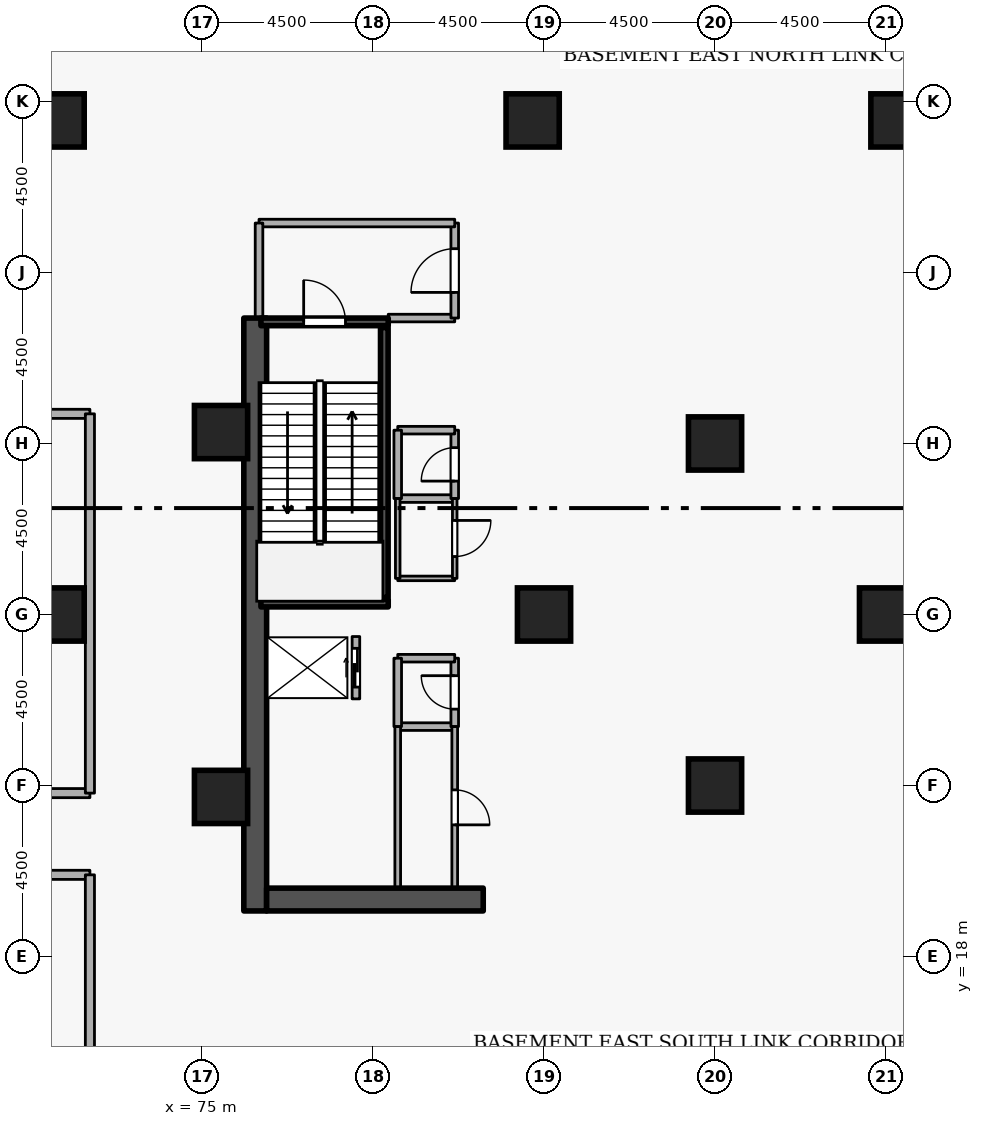
"""IFC4 building model, lengths in metres.
Left out: names, types, materials, properties, quantities, classifications, styles, units other than length and angle.
Written with IfcOpenShell. Run it as: python <this file> out.ifc"""

import sys

from ifc_helpers import new_model, si_unit, direction, frame, frame_2d, origin, origin_2d, place, context, subcontext, project, spatial, rectangle, extrude, element, fill, save


model = new_model("IFC4")
c1 = context("Model", 3, precision=1e-05, world=origin(), true_north=direction((0.0, 1.0)))
c2 = subcontext(c1, "Body", "Model", "MODEL_VIEW")
j1 = project(units=[si_unit("LENGTHUNIT", "METRE"), si_unit("PLANEANGLEUNIT", "RADIAN")], contexts=[c1])
p1 = place(None, origin())
s1 = spatial("IfcSite", under=j1, at=p1, CompositionType="ELEMENT")
p2 = place(p1, origin())
s2 = spatial("IfcBuilding", under=s1, at=p2, CompositionType="ELEMENT")
p3 = place(p2, frame((0.0, 0.0, -5.4)))
s3 = spatial("IfcBuildingStorey", under=s2, at=p3, CompositionType="ELEMENT", Elevation=-5.4)
p4 = place(p3, frame((76.4, 19.2, -0.6), z_axis=(0.0, 0.0, 1.0), x_axis=(0.0, 1.0, 0.0)))
e1 = element("IfcWall", 1, at=p4, inside=s3, PredefinedType="SHEAR", context=c2, shape_type="SweptSolid", body=[
    extrude(rectangle(XDim=15.6, YDim=0.6, at=frame_2d((7.8, 0.0))), origin(), (0.0, 0.0, 1.0), 6.0),
])
p5 = place(p3, frame((76.7, 19.5, -0.6), z_axis=(0.0, 0.0, 1.0), x_axis=(1.0, 0.0, 0.0)))
e2 = element("IfcWall", 2, at=p5, inside=s3, PredefinedType="SHEAR", context=c2, shape_type="SweptSolid", body=[
    extrude(rectangle(XDim=5.7, YDim=0.6, at=frame_2d((2.85, 0.0))), origin(), (0.0, 0.0, 1.0), 6.0),
])
for number, where, z_axis, x_axis in (
    (3, (71.2, 27.0, -0.6), (0.0, 0.0, 1.0), (1.0, 0.0, 0.0)),
    (4, (71.2, 40.0, -0.6), (0.0, 0.0, 1.0), (1.0, 0.0, 0.0)),
    (5, (93.3, 40.0, -0.6), (0.0, 0.0, 1.0), (1.0, 0.0, 0.0)),
    (6, (83.7, 40.0, -0.6), (0.0, 0.0, 1.0), (1.0, 0.0, 0.0)),
    (7, (75.5, 22.2, -0.6), (0.0, 0.0, 1.0), (1.0, 0.0, 0.0)),
    (8, (75.5, 31.8, -0.6), (0.0, 0.0, 1.0), (1.0, 0.0, 0.0)),
    (9, (93.0, 27.0, -0.6), (0.0, 0.0, 1.0), (1.0, 0.0, 0.0)),
    (10, (84.0, 27.0, -0.6), (0.0, 0.0, 1.0), (1.0, 0.0, 0.0)),
    (11, (88.5, 22.5, -0.6), (0.0, 0.0, 1.0), (1.0, 0.0, 0.0)),
    (12, (88.5, 31.5, -0.6), (0.0, 0.0, 1.0), (1.0, 0.0, 0.0)),
):
    element("IfcColumn", number, at=place(p3, frame(where, z_axis=z_axis, x_axis=x_axis)), inside=s3, PredefinedType="COLUMN", context=c2, shape_type="SweptSolid", body=[
        extrude(rectangle(XDim=1.4, YDim=1.4, at=origin_2d()), origin(), (0.0, 0.0, 1.0), 6.0),
    ])
p6 = place(p3, frame((79.05, 24.78, 0.0), z_axis=(0.0, 0.0, 1.0), x_axis=(0.0, 1.0, 0.0)))
e13 = element("IfcWall", 13, at=p6, inside=s3, PredefinedType="STANDARD", context=c2, shape_type="SweptSolid", body=[
    extrude(rectangle(XDim=1.64, YDim=0.2, at=frame_2d((0.82, 0.0))), origin(), (0.0, 0.0, 1.0), 5.06),
])
p7 = place(p6, frame((0.31, 0.0, 0.0)))
e14 = element("IfcOpeningElement", 14, at=p7, cuts=e13, PredefinedType="OPENING", context=c2, shape_type="SweptSolid", body=[
    extrude(rectangle(XDim=1.02, YDim=2.06, at=frame_2d((0.51, 1.03))), frame((0.0, 0.11, 0.0), z_axis=(0.0, -1.0, 0.0), x_axis=(1.0, 0.0, 0.0)), (0.0, 0.0, 1.0), 0.22),
])
p8 = place(p3, frame((76.55, 34.7, -0.6), z_axis=(0.0, 0.0, 1.0), x_axis=(1.0, 0.0, 0.0)))
e15 = element("IfcWall", 15, at=p8, inside=s3, PredefinedType="SHEAR", context=c2, shape_type="SweptSolid", body=[
    extrude(rectangle(XDim=3.35, YDim=0.2, at=frame_2d((1.675, 0.0))), origin(), (0.0, 0.0, 1.0), 6.0),
])
p9 = place(p8, frame((1.125, 0.0, 0.6)))
e16 = element("IfcOpeningElement", 16, at=p9, cuts=e15, PredefinedType="OPENING", context=c2, shape_type="SweptSolid", body=[
    extrude(rectangle(XDim=1.1, YDim=2.1, at=frame_2d((0.55, 1.05))), frame((0.0, 0.11, 0.0), z_axis=(0.0, -1.0, 0.0), x_axis=(1.0, 0.0, 0.0)), (0.0, 0.0, 1.0), 0.22),
])
p10 = place(p3, frame((79.9, 27.3, -0.6), z_axis=(0.0, 0.0, 1.0), x_axis=(-1.0, 0.0, 0.0)))
e17 = element("IfcWall", 17, at=p10, inside=s3, PredefinedType="SHEAR", context=c2, shape_type="SweptSolid", body=[
    extrude(rectangle(XDim=3.35, YDim=0.2, at=frame_2d((1.675, 0.0))), origin(), (0.0, 0.0, 1.0), 6.0),
])
p11 = place(p3, frame((79.797, 27.45, -0.6), z_axis=(0.0, 0.0, 1.0), x_axis=(0.0, 1.0, 0.0)))
e18 = element("IfcWall", 18, at=p11, inside=s3, PredefinedType="SHEAR", context=c2, shape_type="SweptSolid", body=[
    extrude(rectangle(XDim=7.1, YDim=0.2, at=frame_2d((3.55, 0.0))), origin(), (0.0, 0.0, 1.0), 6.0),
])
p12 = place(p3, frame((79.9, 34.8, 0.0), z_axis=(0.0, 0.0, 1.0), x_axis=(1.0, 0.0, 0.0)))
e19 = element("IfcWall", 19, at=p12, inside=s3, PredefinedType="STANDARD", context=c2, shape_type="SweptSolid", body=[
    extrude(rectangle(XDim=1.75, YDim=0.2, at=frame_2d((0.875, 0.0))), origin(), (0.0, 0.0, 1.0), 4.265),
])
p13 = place(p3, frame((81.65, 34.8, 0.0), z_axis=(0.0, 0.0, 1.0), x_axis=(0.0, 1.0, 0.0)))
e20 = element("IfcWall", 20, at=p13, inside=s3, PredefinedType="STANDARD", context=c2, shape_type="SweptSolid", body=[
    extrude(rectangle(XDim=2.5, YDim=0.2, at=frame_2d((1.25, 0.0))), origin(), (0.0, 0.0, 1.0), 5.06),
])
p14 = place(p13, frame((0.675, 0.0, 0.0)))
e21 = element("IfcOpeningElement", 21, at=p14, cuts=e20, PredefinedType="OPENING", context=c2, shape_type="SweptSolid", body=[
    extrude(rectangle(XDim=1.15, YDim=2.1, at=frame_2d((0.575, 1.05))), frame((0.0, 0.11, 0.0), z_axis=(0.0, -1.0, 0.0), x_axis=(1.0, 0.0, 0.0)), (0.0, 0.0, 1.0), 0.22),
])
p15 = place(p3, frame((81.65, 37.3, 0.0), z_axis=(0.0, 0.0, 1.0), x_axis=(-1.0, 0.0, 0.0)))
e22 = element("IfcWall", 22, at=p15, inside=s3, PredefinedType="STANDARD", context=c2, shape_type="SweptSolid", body=[
    extrude(rectangle(XDim=5.15, YDim=0.2, at=frame_2d((2.575, 0.0))), origin(), (0.0, 0.0, 1.0), 5.06),
])
p16 = place(p3, frame((76.5, 37.3, 0.0), z_axis=(0.0, 0.0, 1.0), x_axis=(0.0, -1.0, 0.0)))
e23 = element("IfcWall", 23, at=p16, inside=s3, PredefinedType="STANDARD", context=c2, shape_type="SweptSolid", body=[
    extrude(rectangle(XDim=2.5, YDim=0.2, at=frame_2d((1.25, 0.0))), origin(), (0.0, 0.0, 1.0), 5.06),
])
p17 = place(p3, frame((80.15, 24.05, 0.0), z_axis=(0.0, 0.0, 1.0), x_axis=(1.0, 0.0, 0.0)))
e24 = element("IfcWall", 24, at=p17, inside=s3, PredefinedType="STANDARD", context=c2, shape_type="SweptSolid", body=[
    extrude(rectangle(XDim=1.5, YDim=0.2, at=frame_2d((0.75, 0.0))), origin(), (0.0, 0.0, 1.0), 5.06),
])
p18 = place(p3, frame((81.65, 24.05, 0.0), z_axis=(0.0, 0.0, 1.0), x_axis=(0.0, 1.0, 0.0)))
e25 = element("IfcWall", 25, at=p18, inside=s3, PredefinedType="STANDARD", context=c2, shape_type="SweptSolid", body=[
    extrude(rectangle(XDim=1.8, YDim=0.2, at=frame_2d((0.9, 0.0))), origin(), (0.0, 0.0, 1.0), 5.06),
])
p19 = place(p18, frame((0.46, 0.0, 0.0)))
e26 = element("IfcOpeningElement", 26, at=p19, cuts=e25, PredefinedType="OPENING", context=c2, shape_type="SweptSolid", body=[
    extrude(rectangle(XDim=0.88, YDim=2.04, at=frame_2d((0.44, 1.02))), frame((0.0, 0.11, 0.0), z_axis=(0.0, -1.0, 0.0), x_axis=(1.0, 0.0, 0.0)), (0.0, 0.0, 1.0), 0.22),
])
p20 = place(p3, frame((81.65, 25.85, 0.0), z_axis=(0.0, 0.0, 1.0), x_axis=(-1.0, 0.0, 0.0)))
e27 = element("IfcWall", 27, at=p20, inside=s3, PredefinedType="STANDARD", context=c2, shape_type="SweptSolid", body=[
    extrude(rectangle(XDim=1.5, YDim=0.2, at=frame_2d((0.75, 0.0))), origin(), (0.0, 0.0, 1.0), 5.06),
])
p21 = place(p3, frame((80.15, 25.85, 0.0), z_axis=(0.0, 0.0, 1.0), x_axis=(0.0, -1.0, 0.0)))
e28 = element("IfcWall", 28, at=p21, inside=s3, PredefinedType="STANDARD", context=c2, shape_type="SweptSolid", body=[
    extrude(rectangle(XDim=1.8, YDim=0.2, at=frame_2d((0.9, 0.0))), origin(), (0.0, 0.0, 1.0), 5.06),
])
p22 = place(p3, frame((80.15, 30.05, 0.0), z_axis=(0.0, 0.0, 1.0), x_axis=(1.0, 0.0, 0.0)))
e29 = element("IfcWall", 29, at=p22, inside=s3, PredefinedType="STANDARD", context=c2, shape_type="SweptSolid", body=[
    extrude(rectangle(XDim=1.5, YDim=0.2, at=frame_2d((0.75, 0.0))), origin(), (0.0, 0.0, 1.0), 5.06),
])
p23 = place(p3, frame((81.65, 30.05, 0.0), z_axis=(0.0, 0.0, 1.0), x_axis=(0.0, 1.0, 0.0)))
e30 = element("IfcWall", 30, at=p23, inside=s3, PredefinedType="STANDARD", context=c2, shape_type="SweptSolid", body=[
    extrude(rectangle(XDim=1.8, YDim=0.2, at=frame_2d((0.9, 0.0))), origin(), (0.0, 0.0, 1.0), 5.06),
])
p24 = place(p23, frame((0.46, 0.0, 0.0)))
e31 = element("IfcOpeningElement", 31, at=p24, cuts=e30, PredefinedType="OPENING", context=c2, shape_type="SweptSolid", body=[
    extrude(rectangle(XDim=0.88, YDim=2.04, at=frame_2d((0.44, 1.02))), frame((0.0, 0.11, 0.0), z_axis=(0.0, -1.0, 0.0), x_axis=(1.0, 0.0, 0.0)), (0.0, 0.0, 1.0), 0.22),
])
p25 = place(p3, frame((81.65, 31.85, 0.0), z_axis=(0.0, 0.0, 1.0), x_axis=(-1.0, 0.0, 0.0)))
e32 = element("IfcWall", 32, at=p25, inside=s3, PredefinedType="STANDARD", context=c2, shape_type="SweptSolid", body=[
    extrude(rectangle(XDim=1.5, YDim=0.2, at=frame_2d((0.75, 0.0))), origin(), (0.0, 0.0, 1.0), 5.06),
])
p26 = place(p3, frame((80.15, 31.85, 0.0), z_axis=(0.0, 0.0, 1.0), x_axis=(0.0, -1.0, 0.0)))
e33 = element("IfcWall", 33, at=p26, inside=s3, PredefinedType="STANDARD", context=c2, shape_type="SweptSolid", body=[
    extrude(rectangle(XDim=1.8, YDim=0.2, at=frame_2d((0.9, 0.0))), origin(), (0.0, 0.0, 1.0), 5.06),
])
p27 = place(p3, frame((55.8, 20.15, 0.0), z_axis=(0.0, 0.0, 1.0), x_axis=(1.0, 0.0, 0.0)))
e34 = element("IfcWall", 34, at=p27, inside=s3, PredefinedType="STANDARD", context=c2, shape_type="SweptSolid", body=[
    extrude(rectangle(XDim=16.25, YDim=0.24, at=frame_2d((8.125, 0.0))), origin(), (0.0, 0.0, 1.0), 5.06),
])
p28 = place(p27, frame((7.525, 0.0, 0.0)))
e35 = element("IfcOpeningElement", 35, at=p28, cuts=e34, PredefinedType="OPENING", context=c2, shape_type="SweptSolid", body=[
    extrude(rectangle(XDim=1.2, YDim=2.1, at=frame_2d((0.6, 1.05))), frame((0.0, 0.13, 0.0), z_axis=(0.0, -1.0, 0.0), x_axis=(1.0, 0.0, 0.0)), (0.0, 0.0, 1.0), 0.26),
])
p29 = place(p3, frame((72.05, 20.15, 0.0), z_axis=(0.0, 0.0, 1.0), x_axis=(0.0, -1.0, 0.0)))
e36 = element("IfcWall", 36, at=p29, inside=s3, PredefinedType="STANDARD", context=c2, shape_type="SweptSolid", body=[
    extrude(rectangle(XDim=14.15, YDim=0.24, at=frame_2d((7.075, 0.0))), origin(), (0.0, 0.0, 1.0), 5.06),
])
p30 = place(p3, frame((72.05, 22.3, 0.0), z_axis=(0.0, 0.0, 1.0), x_axis=(-1.0, 0.0, 0.0)))
e37 = element("IfcWall", 37, at=p30, inside=s3, PredefinedType="STANDARD", context=c2, shape_type="SweptSolid", body=[
    extrude(rectangle(XDim=13.85, YDim=0.24, at=frame_2d((6.925, 0.0))), origin(), (0.0, 0.0, 1.0), 5.06),
])
p31 = place(p30, frame((6.325, 0.0, 0.0)))
e38 = element("IfcOpeningElement", 38, at=p31, cuts=e37, PredefinedType="OPENING", context=c2, shape_type="SweptSolid", body=[
    extrude(rectangle(XDim=1.2, YDim=2.1, at=frame_2d((0.6, 1.05))), frame((0.0, 0.13, 0.0), z_axis=(0.0, -1.0, 0.0), x_axis=(1.0, 0.0, 0.0)), (0.0, 0.0, 1.0), 0.26),
])
p32 = place(p3, frame((58.2, 32.28, 0.0), z_axis=(0.0, 0.0, 1.0), x_axis=(1.0, 0.0, 0.0)))
e39 = element("IfcWall", 39, at=p32, inside=s3, PredefinedType="STANDARD", context=c2, shape_type="SweptSolid", body=[
    extrude(rectangle(XDim=13.85, YDim=0.24, at=frame_2d((6.925, 0.0))), origin(), (0.0, 0.0, 1.0), 5.06),
])
p33 = place(p3, frame((72.05, 32.28, 0.0), z_axis=(0.0, 0.0, 1.0), x_axis=(0.0, -1.0, 0.0)))
e40 = element("IfcWall", 40, at=p33, inside=s3, PredefinedType="STANDARD", context=c2, shape_type="SweptSolid", body=[
    extrude(rectangle(XDim=9.98, YDim=0.24, at=frame_2d((4.99, 0.0))), origin(), (0.0, 0.0, 1.0), 5.06),
])
p34 = place(p3, frame((80.15, 19.8, 0.0), z_axis=(0.0, 0.0, 1.0), x_axis=(0.0, 1.0, 0.0)))
e41 = element("IfcWall", 41, at=p34, inside=s3, PredefinedType="PARTITIONING", context=c2, shape_type="SweptSolid", body=[
    extrude(rectangle(XDim=4.25, YDim=0.15, at=frame_2d((2.125, 0.0))), origin(), (0.0, 0.0, 1.0), 5.06),
])
p35 = place(p3, frame((81.65, 24.05, 0.0), z_axis=(0.0, 0.0, 1.0), x_axis=(0.0, -1.0, 0.0)))
e42 = element("IfcWall", 42, at=p35, inside=s3, PredefinedType="PARTITIONING", context=c2, shape_type="SweptSolid", body=[
    extrude(rectangle(XDim=4.25, YDim=0.15, at=frame_2d((2.125, 0.0))), origin(), (0.0, 0.0, 1.0), 5.06),
])
p36 = place(p35, frame((1.665, 0.0, 0.0)))
e43 = element("IfcOpeningElement", 43, at=p36, cuts=e42, PredefinedType="OPENING", context=c2, shape_type="SweptSolid", body=[
    extrude(rectangle(XDim=0.92, YDim=2.08, at=frame_2d((0.46, 1.04))), frame((0.0, 0.085, 0.0), z_axis=(0.0, -1.0, 0.0), x_axis=(1.0, 0.0, 0.0)), (0.0, 0.0, 1.0), 0.17),
])
p37 = place(p3, frame((81.65, 27.95, 0.0), z_axis=(0.0, 0.0, 1.0), x_axis=(-1.0, 0.0, 0.0)))
e44 = element("IfcWall", 44, at=p37, inside=s3, PredefinedType="PARTITIONING", context=c2, shape_type="SweptSolid", body=[
    extrude(rectangle(XDim=1.5, YDim=0.12, at=frame_2d((0.75, 0.0))), origin(), (0.0, 0.0, 1.0), 5.06),
])
p38 = place(p3, frame((80.15, 27.95, 0.0), z_axis=(0.0, 0.0, 1.0), x_axis=(0.0, 1.0, 0.0)))
e45 = element("IfcWall", 45, at=p38, inside=s3, PredefinedType="PARTITIONING", context=c2, shape_type="SweptSolid", body=[
    extrude(rectangle(XDim=2.1, YDim=0.12, at=frame_2d((1.05, 0.0))), origin(), (0.0, 0.0, 1.0), 5.06),
])
p39 = place(p3, frame((81.65, 30.05, 0.0), z_axis=(0.0, 0.0, 1.0), x_axis=(0.0, -1.0, 0.0)))
e46 = element("IfcWall", 46, at=p39, inside=s3, PredefinedType="PARTITIONING", context=c2, shape_type="SweptSolid", body=[
    extrude(rectangle(XDim=2.1, YDim=0.12, at=frame_2d((1.05, 0.0))), origin(), (0.0, 0.0, 1.0), 5.06),
])
p40 = place(p39, frame((0.575, 0.0, 0.0)))
e47 = element("IfcOpeningElement", 47, at=p40, cuts=e46, PredefinedType="OPENING", context=c2, shape_type="SweptSolid", body=[
    extrude(rectangle(XDim=0.95, YDim=2.1, at=frame_2d((0.475, 1.05))), frame((0.0, 0.07, 0.0), z_axis=(0.0, -1.0, 0.0), x_axis=(1.0, 0.0, 0.0)), (0.0, 0.0, 1.0), 0.14),
])
p41 = place(p7, origin())
e48 = element("IfcDoor", 48, at=p41, inside=s3, OperationType="SLIDING_TO_LEFT", PredefinedType="DOOR", context=c2, shape_type="SweptSolid", body=[
    extrude(rectangle(XDim=1.02, YDim=2.06, at=frame_2d((0.51, 1.03))), frame((0.0, 0.025, 0.0), z_axis=(0.0, -1.0, 0.0), x_axis=(1.0, 0.0, 0.0)), (0.0, 0.0, 1.0), 0.05),
])
fill(e14, e48)
p42 = place(p9, origin())
e49 = element("IfcDoor", 49, at=p42, inside=s3, OperationType="SINGLE_SWING_LEFT", PredefinedType="DOOR", context=c2, shape_type="SweptSolid", body=[
    extrude(rectangle(XDim=1.1, YDim=2.1, at=frame_2d((0.55, 1.05))), frame((0.0, 0.025, 0.0), z_axis=(0.0, -1.0, 0.0), x_axis=(1.0, 0.0, 0.0)), (0.0, 0.0, 1.0), 0.05),
])
fill(e16, e49)
p43 = place(p14, origin())
e50 = element("IfcDoor", 50, at=p43, inside=s3, OperationType="SINGLE_SWING_LEFT", PredefinedType="DOOR", context=c2, shape_type="SweptSolid", body=[
    extrude(rectangle(XDim=1.15, YDim=2.1, at=frame_2d((0.575, 1.05))), frame((0.0, 0.025, 0.0), z_axis=(0.0, -1.0, 0.0), x_axis=(1.0, 0.0, 0.0)), (0.0, 0.0, 1.0), 0.05),
])
fill(e21, e50)
p44 = place(p19, origin())
e51 = element("IfcDoor", 51, at=p44, inside=s3, OperationType="SINGLE_SWING_RIGHT", PredefinedType="DOOR", context=c2, shape_type="SweptSolid", body=[
    extrude(rectangle(XDim=0.88, YDim=2.04, at=frame_2d((0.44, 1.02))), frame((0.0, 0.025, 0.0), z_axis=(0.0, -1.0, 0.0), x_axis=(1.0, 0.0, 0.0)), (0.0, 0.0, 1.0), 0.05),
])
fill(e26, e51)
p45 = place(p24, origin())
e52 = element("IfcDoor", 52, at=p45, inside=s3, OperationType="SINGLE_SWING_LEFT", PredefinedType="DOOR", context=c2, shape_type="SweptSolid", body=[
    extrude(rectangle(XDim=0.88, YDim=2.04, at=frame_2d((0.44, 1.02))), frame((0.0, 0.025, 0.0), z_axis=(0.0, -1.0, 0.0), x_axis=(1.0, 0.0, 0.0)), (0.0, 0.0, 1.0), 0.05),
])
fill(e31, e52)
p46 = place(p36, origin())
e53 = element("IfcDoor", 53, at=p46, inside=s3, OperationType="SINGLE_SWING_RIGHT", PredefinedType="DOOR", context=c2, shape_type="SweptSolid", body=[
    extrude(rectangle(XDim=0.92, YDim=2.08, at=frame_2d((0.46, 1.04))), frame((0.0, 0.025, 0.0), z_axis=(0.0, -1.0, 0.0), x_axis=(1.0, 0.0, 0.0)), (0.0, 0.0, 1.0), 0.05),
])
fill(e43, e53)
p47 = place(p40, origin())
e54 = element("IfcDoor", 54, at=p47, inside=s3, OperationType="SINGLE_SWING_LEFT", PredefinedType="DOOR", context=c2, shape_type="SweptSolid", body=[
    extrude(rectangle(XDim=0.95, YDim=2.1, at=frame_2d((0.475, 1.05))), frame((0.0, 0.025, 0.0), z_axis=(0.0, -1.0, 0.0), x_axis=(1.0, 0.0, 0.0)), (0.0, 0.0, 1.0), 0.05),
])
fill(e47, e54)
save(model, sys.argv[1])
